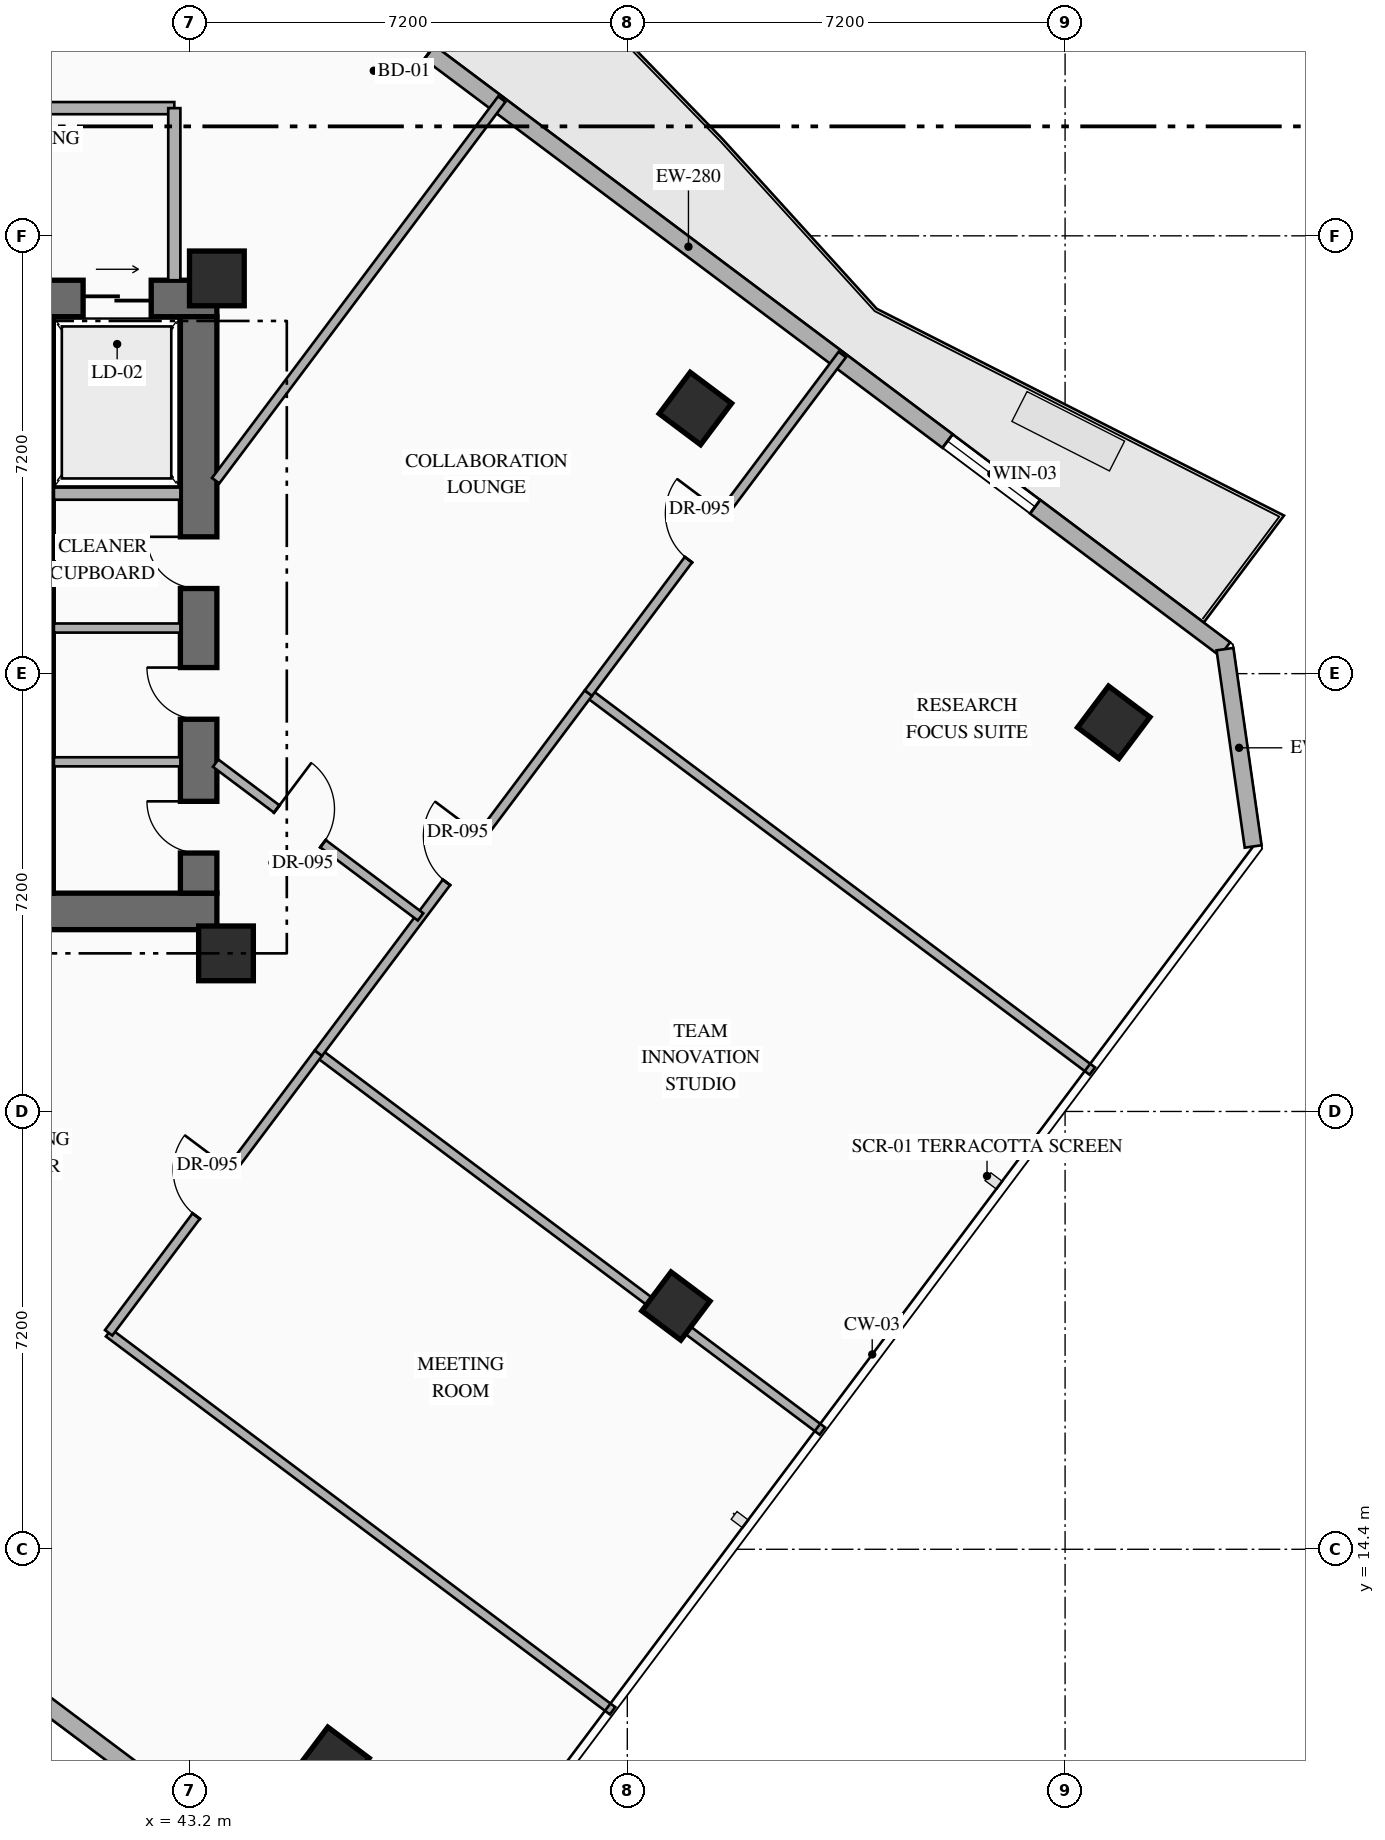
"""IFC4 building model, lengths in metres.
Left out: names, types, materials, properties, quantities, classifications, styles, units other than length and angle.
Written with IfcOpenShell. Run it as: python <this file> out.ifc"""

import sys

from ifc_helpers import new_model, si_unit, direction, frame, frame_2d, origin, origin_2d, place, context, subcontext, project, spatial, rectangle, hollow_rectangle, extrude, element, fill, save


model = new_model("IFC4")
c1 = context("Model", 3, precision=1e-05, world=origin(), true_north=direction((0.0, 1.0)))
c2 = subcontext(c1, "Body", "Model", "MODEL_VIEW")
j1 = project(units=[si_unit("LENGTHUNIT", "METRE"), si_unit("PLANEANGLEUNIT", "RADIAN")], contexts=[c1])
p1 = place(None, origin())
s1 = spatial("IfcSite", under=j1, at=p1, CompositionType="ELEMENT")
p2 = place(p1, origin())
s2 = spatial("IfcBuilding", under=s1, at=p2, CompositionType="ELEMENT")
p3 = place(p2, frame((0.0, 0.0, 160.05)))
s3 = spatial("IfcBuildingStorey", under=s2, at=p3, CompositionType="ELEMENT", Elevation=160.05)
p4 = place(p3, frame((35.89, 24.89, 0.0), z_axis=(0.0, 0.0, 1.0), x_axis=(1.0, 0.0, 0.0)))
e1 = element("IfcWall", 1, at=p4, inside=s3, PredefinedType="SHEAR", context=c2, shape_type="SweptSolid", body=[
    extrude(rectangle(XDim=7.76, YDim=0.6, at=frame_2d((3.88, 0.0))), origin(), (0.0, 0.0, 1.0), 3.6),
])
p5 = place(p3, frame((35.89, 34.97, 0.0), z_axis=(0.0, 0.0, 1.0), x_axis=(1.0, 0.0, 0.0)))
e2 = element("IfcWall", 2, at=p5, inside=s3, PredefinedType="SHEAR", context=c2, shape_type="SweptSolid", body=[
    extrude(rectangle(XDim=7.76, YDim=0.6, at=frame_2d((3.88, 0.0))), origin(), (0.0, 0.0, 1.0), 3.6),
])
p6 = place(p5, frame((2.66, 0.0, 0.0)))
e3 = element("IfcOpeningElement", 3, at=p6, cuts=e2, PredefinedType="OPENING", context=c2, shape_type="SweptSolid", body=[
    extrude(rectangle(XDim=1.1, YDim=2.2, at=frame_2d((0.55, 1.1))), frame((0.0, 0.31, 0.0), z_axis=(0.0, -1.0, 0.0), x_axis=(1.0, 0.0, 0.0)), (0.0, 0.0, 1.0), 0.62),
])
p7 = place(p5, frame((5.56, 0.0, 0.0)))
e4 = element("IfcOpeningElement", 4, at=p7, cuts=e2, PredefinedType="OPENING", context=c2, shape_type="SweptSolid", body=[
    extrude(rectangle(XDim=1.12, YDim=2.15, at=frame_2d((0.56, 1.075))), frame((0.0, 0.31, 0.0), z_axis=(0.0, -1.0, 0.0), x_axis=(1.0, 0.0, 0.0)), (0.0, 0.0, 1.0), 0.62),
])
p8 = place(p3, frame((43.35, 25.19, 0.0), z_axis=(0.0, 0.0, 1.0), x_axis=(0.0, 1.0, 0.0)))
e5 = element("IfcWall", 5, at=p8, inside=s3, PredefinedType="SHEAR", context=c2, shape_type="SweptSolid", body=[
    extrude(rectangle(XDim=9.48, YDim=0.6, at=frame_2d((4.74, 0.0))), origin(), (0.0, 0.0, 1.0), 3.6),
])
p9 = place(p8, frame((0.66, 0.0, 0.0)))
e6 = element("IfcOpeningElement", 6, at=p9, cuts=e5, PredefinedType="OPENING", context=c2, shape_type="SweptSolid", body=[
    extrude(rectangle(XDim=0.85, YDim=2.08, at=frame_2d((0.425, 1.04))), frame((0.0, 0.31, 0.0), z_axis=(0.0, -1.0, 0.0), x_axis=(1.0, 0.0, 0.0)), (0.0, 0.0, 1.0), 0.62),
])
p10 = place(p8, frame((2.86, 0.0, 0.0)))
e7 = element("IfcOpeningElement", 7, at=p10, cuts=e5, PredefinedType="OPENING", context=c2, shape_type="SweptSolid", body=[
    extrude(rectangle(XDim=0.85, YDim=2.08, at=frame_2d((0.425, 1.04))), frame((0.0, 0.31, 0.0), z_axis=(0.0, -1.0, 0.0), x_axis=(1.0, 0.0, 0.0)), (0.0, 0.0, 1.0), 0.62),
])
p11 = place(p8, frame((5.01, 0.0, 0.0)))
e8 = element("IfcOpeningElement", 8, at=p11, cuts=e5, PredefinedType="OPENING", context=c2, shape_type="SweptSolid", body=[
    extrude(rectangle(XDim=0.85, YDim=2.08, at=frame_2d((0.425, 1.04))), frame((0.0, 0.31, 0.0), z_axis=(0.0, -1.0, 0.0), x_axis=(1.0, 0.0, 0.0)), (0.0, 0.0, 1.0), 0.62),
])
p12 = place(p3, frame((40.81, 25.19, 0.0), z_axis=(0.0, 0.0, 1.0), x_axis=(0.0, 1.0, 0.0)))
e9 = element("IfcWall", 9, at=p12, inside=s3, PredefinedType="SHEAR", context=c2, shape_type="SweptSolid", body=[
    extrude(rectangle(XDim=9.48, YDim=0.3, at=frame_2d((4.74, 0.0))), origin(), (0.0, 0.0, 1.0), 3.6),
])
for number, where, z_axis, x_axis in (
    (10, (43.8, 24.2, 0.0), (0.0, 0.0, 1.0), (1.0, 0.0, 0.0)),
    (11, (43.65, 35.3, 0.0), (0.0, 0.0, 1.0), (1.0, 0.0, 0.0)),
):
    element("IfcColumn", number, at=place(p3, frame(where, z_axis=z_axis, x_axis=x_axis)), inside=s3, PredefinedType="COLUMN", context=c2, shape_type="SweptSolid", body=[
        extrude(rectangle(XDim=0.9, YDim=0.9, at=origin_2d()), origin(), (0.0, 0.0, 1.0), 3.6),
    ])
for number, where, z_axis, x_axis in (
    (12, (51.52, 33.16, 0.0), (0.0, 0.0, 1.0), (0.8, -0.6, 0.0)),
    (13, (45.56, 10.88, 0.0), (0.0, 0.0, 1.0), (0.8, -0.6, 0.0)),
    (14, (58.4, 28.0, 0.0), (0.0, 0.0, 1.0), (0.8, -0.6, 0.0)),
):
    element("IfcColumn", number, at=place(p3, frame(where, z_axis=z_axis, x_axis=x_axis)), inside=s3, PredefinedType="COLUMN", context=c2, shape_type="SweptSolid", body=[
        extrude(hollow_rectangle(XDim=0.85, YDim=0.85, WallThickness=0.032, at=origin_2d()), origin(), (0.0, 0.0, 1.0), 3.6),
    ])
p13 = place(p3, frame((51.2, 18.4, 0.0), z_axis=(0.0, 0.0, 1.0), x_axis=(0.799999996291, -0.600000004945, 0.0)))
e15 = element("IfcColumn", 15, at=p13, inside=s3, PredefinedType="COLUMN", context=c2, shape_type="SweptSolid", body=[
    extrude(hollow_rectangle(XDim=0.8, YDim=0.8, WallThickness=0.032, at=origin_2d()), origin(), (0.0, 0.0, 1.0), 3.6),
])
p14 = place(p3, frame((44.86, 40.73, 0.0), z_axis=(0.0, 0.0, 1.0), x_axis=(0.800007624502, -0.599989833863, 0.0)))
e16 = element("IfcWall", 16, at=p14, inside=s3, PredefinedType="STANDARD", context=c2, shape_type="SweptSolid", body=[
    extrude(rectangle(XDim=19.212, YDim=0.28, at=frame_2d((9.606, 0.0))), origin(), (0.0, 0.0, 1.0), 3.35),
])
p15 = place(p14, frame((1.755, 0.0, 0.0)))
e17 = element("IfcOpeningElement", 17, at=p15, cuts=e16, PredefinedType="OPENING", context=c2, shape_type="SweptSolid", body=[
    extrude(rectangle(XDim=1.1, YDim=2.2, at=frame_2d((0.55, 1.1))), frame((0.0, 0.15, 0.0), z_axis=(0.0, -1.0, 0.0), x_axis=(1.0, 0.0, 0.0)), (0.0, 0.0, 1.0), 0.3),
])
p16 = place(p14, frame((13.509, 0.0, 0.85)))
e18 = element("IfcOpeningElement", 18, at=p16, cuts=e16, PredefinedType="OPENING", context=c2, shape_type="SweptSolid", body=[
    extrude(rectangle(XDim=1.8, YDim=2.1, at=frame_2d((0.9, 1.05))), frame((0.0, 0.15, 0.0), z_axis=(0.0, -1.0, 0.0), x_axis=(1.0, 0.0, 0.0)), (0.0, 0.0, 1.0), 0.3),
])
p17 = place(p3, frame((60.23, 29.203, 0.0), z_axis=(0.0, 0.0, 1.0), x_axis=(0.141296221922, -0.989967361922, 0.0)))
e19 = element("IfcWall", 19, at=p17, inside=s3, PredefinedType="STANDARD", context=c2, shape_type="SweptSolid", body=[
    extrude(rectangle(XDim=3.278, YDim=0.28, at=frame_2d((1.639, 0.0))), origin(), (0.0, 0.0, 1.0), 3.35),
])
p18 = place(p3, frame((44.918, 8.787, 0.0), z_axis=(0.0, 0.0, 1.0), x_axis=(-0.800004765927, 0.599993645378, 0.0)))
e20 = element("IfcWall", 20, at=p18, inside=s3, PredefinedType="STANDARD", context=c2, shape_type="SweptSolid", body=[
    extrude(rectangle(XDim=24.588, YDim=0.28, at=frame_2d((12.294, 0.0))), origin(), (0.0, 0.0, 1.0), 3.35),
])
p19 = place(p3, frame((40.97, 31.76, 0.0), z_axis=(0.0, 0.0, 1.0), x_axis=(1.0, 0.0, 0.0)))
e21 = element("IfcWall", 21, at=p19, inside=s3, PredefinedType="STANDARD", context=c2, shape_type="SweptSolid", body=[
    extrude(rectangle(XDim=2.08, YDim=0.2, at=frame_2d((1.04, 0.0))), origin(), (0.0, 0.0, 1.0), 3.35),
])
for number, where, z_axis, x_axis in (
    (22, (40.97, 27.35, 0.0), (0.0, 0.0, 1.0), (1.0, 0.0, 0.0)),
    (23, (40.97, 29.55, 0.0), (0.0, 0.0, 1.0), (1.0, 0.0, 0.0)),
):
    element("IfcWall", number, at=place(p3, frame(where, z_axis=z_axis, x_axis=x_axis)), inside=s3, PredefinedType="PARTITIONING", context=c2, shape_type="SweptSolid", body=[
        extrude(rectangle(XDim=2.08, YDim=0.15, at=frame_2d((1.04, 0.0))), origin(), (0.0, 0.0, 1.0), 3.35),
    ])
p20 = place(p3, frame((37.65, 38.1, 0.0), z_axis=(0.0, 0.0, 1.0), x_axis=(1.0, 0.0, 0.0)))
e24 = element("IfcWall", 24, at=p20, inside=s3, PredefinedType="STANDARD", context=c2, shape_type="SweptSolid", body=[
    extrude(rectangle(XDim=5.3, YDim=0.2, at=frame_2d((2.65, 0.0))), origin(), (0.0, 0.0, 1.0), 3.35),
])
p21 = place(p3, frame((42.95, 35.27, 0.0), z_axis=(0.0, 0.0, 1.0), x_axis=(0.0, 1.0, 0.0)))
e25 = element("IfcWall", 25, at=p21, inside=s3, PredefinedType="STANDARD", context=c2, shape_type="SweptSolid", body=[
    extrude(rectangle(XDim=2.83, YDim=0.2, at=frame_2d((1.415, 0.0))), origin(), (0.0, 0.0, 1.0), 3.35),
])
p22 = place(p3, frame((41.87, 17.96, 0.0), z_axis=(0.0, 0.0, 1.0), x_axis=(0.799991516197, -0.600011311571, 0.0)))
e26 = element("IfcWall", 26, at=p22, inside=s3, PredefinedType="PARTITIONING", context=c2, shape_type="SweptSolid", body=[
    extrude(rectangle(XDim=10.36, YDim=0.15, at=frame_2d((5.18, 0.0))), origin(), (0.0, 0.0, 1.0), 3.35),
])
p23 = place(p3, frame((45.32, 22.56, 0.0), z_axis=(0.0, 0.0, 1.0), x_axis=(0.799991516197, -0.600011311571, 0.0)))
e27 = element("IfcWall", 27, at=p23, inside=s3, PredefinedType="PARTITIONING", context=c2, shape_type="SweptSolid", body=[
    extrude(rectangle(XDim=10.36, YDim=0.15, at=frame_2d((5.18, 0.0))), origin(), (0.0, 0.0, 1.0), 2.695),
])
p24 = place(p3, frame((41.87, 17.96, 0.0), z_axis=(0.0, 0.0, 1.0), x_axis=(0.599986413072, 0.800010190015, 0.0)))
e28 = element("IfcWall", 28, at=p24, inside=s3, PredefinedType="PARTITIONING", context=c2, shape_type="SweptSolid", body=[
    extrude(rectangle(XDim=5.75, YDim=0.15, at=frame_2d((2.875, 0.0))), origin(), (0.0, 0.0, 1.0), 3.35),
])
p25 = place(p24, frame((2.4, 0.0, 0.0)))
e29 = element("IfcOpeningElement", 29, at=p25, cuts=e28, PredefinedType="OPENING", context=c2, shape_type="SweptSolid", body=[
    extrude(rectangle(XDim=0.95, YDim=2.15, at=frame_2d((0.475, 1.075))), frame((0.0, 0.085, 0.0), z_axis=(0.0, -1.0, 0.0), x_axis=(1.0, 0.0, 0.0)), (0.0, 0.0, 1.0), 0.17),
])
p26 = place(p3, frame((49.76, 28.48, 0.0), z_axis=(0.0, 0.0, 1.0), x_axis=(0.8, -0.6, 0.0)))
e30 = element("IfcWall", 30, at=p26, inside=s3, PredefinedType="PARTITIONING", context=c2, shape_type="SweptSolid", body=[
    extrude(rectangle(XDim=10.36, YDim=0.15, at=frame_2d((5.18, 0.0))), origin(), (0.0, 0.0, 1.0), 3.35),
])
p27 = place(p3, frame((45.32, 22.56, 0.0), z_axis=(0.0, 0.0, 1.0), x_axis=(0.6, 0.8, 0.0)))
e31 = element("IfcWall", 31, at=p27, inside=s3, PredefinedType="PARTITIONING", context=c2, shape_type="SweptSolid", body=[
    extrude(rectangle(XDim=7.4, YDim=0.15, at=frame_2d((3.7, 0.0))), origin(), (0.0, 0.0, 1.0), 3.35),
])
p28 = place(p27, frame((3.51, 0.0, 0.0)))
e32 = element("IfcOpeningElement", 32, at=p28, cuts=e31, PredefinedType="OPENING", context=c2, shape_type="SweptSolid", body=[
    extrude(rectangle(XDim=0.95, YDim=2.15, at=frame_2d((0.475, 1.075))), frame((0.0, 0.085, 0.0), z_axis=(0.0, -1.0, 0.0), x_axis=(1.0, 0.0, 0.0)), (0.0, 0.0, 1.0), 0.17),
])
p29 = place(p3, frame((49.76, 28.48, 0.0), z_axis=(0.0, 0.0, 1.0), x_axis=(0.599994387644, 0.800004209236, 0.0)))
e33 = element("IfcWall", 33, at=p29, inside=s3, PredefinedType="PARTITIONING", context=c2, shape_type="SweptSolid", body=[
    extrude(rectangle(XDim=6.96, YDim=0.15, at=frame_2d((3.48, 0.0))), origin(), (0.0, 0.0, 1.0), 3.35),
])
p30 = place(p29, frame((2.743, 0.0, 0.0)))
e34 = element("IfcOpeningElement", 34, at=p30, cuts=e33, PredefinedType="OPENING", context=c2, shape_type="SweptSolid", body=[
    extrude(rectangle(XDim=0.95, YDim=2.15, at=frame_2d((0.475, 1.075))), frame((0.0, 0.085, 0.0), z_axis=(0.0, -1.0, 0.0), x_axis=(1.0, 0.0, 0.0)), (0.0, 0.0, 1.0), 0.17),
])
p31 = place(p3, frame((43.63, 27.328, 0.0), z_axis=(0.0, 0.0, 1.0), x_axis=(0.799972182084, -0.600037088764, 0.0)))
e35 = element("IfcWall", 35, at=p31, inside=s3, PredefinedType="PARTITIONING", context=c2, shape_type="SweptSolid", body=[
    extrude(rectangle(XDim=4.213, YDim=0.15, at=frame_2d((2.106, 0.0))), origin(), (0.0, 0.0, 1.0), 3.045),
])
p32 = place(p31, frame((1.256, 0.0, 0.0)))
e36 = element("IfcOpeningElement", 36, at=p32, cuts=e35, PredefinedType="OPENING", context=c2, shape_type="SweptSolid", body=[
    extrude(rectangle(XDim=0.95, YDim=2.15, at=frame_2d((0.475, 1.075))), frame((0.0, 0.085, 0.0), z_axis=(0.0, -1.0, 0.0), x_axis=(1.0, 0.0, 0.0)), (0.0, 0.0, 1.0), 0.17),
])
p33 = place(p3, frame((43.63, 31.973, 0.0), z_axis=(0.0, 0.0, 1.0), x_axis=(0.599975099311, 0.800018674911, 0.0)))
e37 = element("IfcWall", 37, at=p33, inside=s3, PredefinedType="PARTITIONING", context=c2, shape_type="SweptSolid", body=[
    extrude(rectangle(XDim=7.844, YDim=0.15, at=frame_2d((3.922, 0.0))), origin(), (0.0, 0.0, 1.0), 3.35),
])
p34 = place(p15, origin())
e38 = element("IfcDoor", 38, at=p34, inside=s3, OperationType="SINGLE_SWING_LEFT", PredefinedType="DOOR", context=c2, shape_type="SweptSolid", body=[
    extrude(rectangle(XDim=1.1, YDim=2.2, at=frame_2d((0.55, 1.1))), frame((0.0, 0.025, 0.0), z_axis=(0.0, -1.0, 0.0), x_axis=(1.0, 0.0, 0.0)), (0.0, 0.0, 1.0), 0.05),
])
fill(e17, e38)
p35 = place(p16, origin())
e39 = element("IfcWindow", 39, at=p35, inside=s3, PartitioningType="SINGLE_PANEL", PredefinedType="WINDOW", context=c2, shape_type="SweptSolid", body=[
    extrude(rectangle(XDim=1.8, YDim=2.1, at=frame_2d((0.9, 1.05))), frame((0.0, 0.03, 0.0), z_axis=(0.0, -1.0, 0.0), x_axis=(1.0, 0.0, 0.0)), (0.0, 0.0, 1.0), 0.06),
])
fill(e18, e39)
p36 = place(p7, origin())
e40 = element("IfcDoor", 40, at=p36, inside=s3, OperationType="SLIDING_TO_RIGHT", PredefinedType="USERDEFINED", context=c2, shape_type="SweptSolid", body=[
    extrude(rectangle(XDim=1.12, YDim=2.15, at=frame_2d((0.56, 1.075))), frame((0.0, 0.025, 0.0), z_axis=(0.0, -1.0, 0.0), x_axis=(1.0, 0.0, 0.0)), (0.0, 0.0, 1.0), 0.05),
])
fill(e4, e40)
p37 = place(p9, origin())
e41 = element("IfcDoor", 41, at=p37, inside=s3, OperationType="SINGLE_SWING_RIGHT", PredefinedType="DOOR", context=c2, shape_type="SweptSolid", body=[
    extrude(rectangle(XDim=0.85, YDim=2.08, at=frame_2d((0.425, 1.04))), frame((0.0, 0.025, 0.0), z_axis=(0.0, -1.0, 0.0), x_axis=(1.0, 0.0, 0.0)), (0.0, 0.0, 1.0), 0.05),
])
fill(e6, e41)
p38 = place(p10, origin())
e42 = element("IfcDoor", 42, at=p38, inside=s3, OperationType="SINGLE_SWING_RIGHT", PredefinedType="DOOR", context=c2, shape_type="SweptSolid", body=[
    extrude(rectangle(XDim=0.85, YDim=2.08, at=frame_2d((0.425, 1.04))), frame((0.0, 0.025, 0.0), z_axis=(0.0, -1.0, 0.0), x_axis=(1.0, 0.0, 0.0)), (0.0, 0.0, 1.0), 0.05),
])
fill(e7, e42)
p39 = place(p11, origin())
e43 = element("IfcDoor", 43, at=p39, inside=s3, OperationType="SINGLE_SWING_RIGHT", PredefinedType="DOOR", context=c2, shape_type="SweptSolid", body=[
    extrude(rectangle(XDim=0.85, YDim=2.08, at=frame_2d((0.425, 1.04))), frame((0.0, 0.025, 0.0), z_axis=(0.0, -1.0, 0.0), x_axis=(1.0, 0.0, 0.0)), (0.0, 0.0, 1.0), 0.05),
])
fill(e8, e43)
p40 = place(p25, origin())
e44 = element("IfcDoor", 44, at=p40, inside=s3, OperationType="SINGLE_SWING_RIGHT", PredefinedType="DOOR", context=c2, shape_type="SweptSolid", body=[
    extrude(rectangle(XDim=0.95, YDim=2.15, at=frame_2d((0.475, 1.075))), frame((0.0, 0.025, 0.0), z_axis=(0.0, -1.0, 0.0), x_axis=(1.0, 0.0, 0.0)), (0.0, 0.0, 1.0), 0.05),
])
fill(e29, e44)
p41 = place(p28, origin())
e45 = element("IfcDoor", 45, at=p41, inside=s3, OperationType="SINGLE_SWING_RIGHT", PredefinedType="DOOR", context=c2, shape_type="SweptSolid", body=[
    extrude(rectangle(XDim=0.95, YDim=2.15, at=frame_2d((0.475, 1.075))), frame((0.0, 0.025, 0.0), z_axis=(0.0, -1.0, 0.0), x_axis=(1.0, 0.0, 0.0)), (0.0, 0.0, 1.0), 0.05),
])
fill(e32, e45)
p42 = place(p30, origin())
e46 = element("IfcDoor", 46, at=p42, inside=s3, OperationType="SINGLE_SWING_RIGHT", PredefinedType="DOOR", context=c2, shape_type="SweptSolid", body=[
    extrude(rectangle(XDim=0.95, YDim=2.15, at=frame_2d((0.475, 1.075))), frame((0.0, 0.025, 0.0), z_axis=(0.0, -1.0, 0.0), x_axis=(1.0, 0.0, 0.0)), (0.0, 0.0, 1.0), 0.05),
])
fill(e34, e46)
p43 = place(p32, origin())
e47 = element("IfcDoor", 47, at=p43, inside=s3, OperationType="SINGLE_SWING_LEFT", PredefinedType="DOOR", context=c2, shape_type="SweptSolid", body=[
    extrude(rectangle(XDim=0.95, YDim=2.15, at=frame_2d((0.475, 1.075))), frame((0.0, 0.025, 0.0), z_axis=(0.0, -1.0, 0.0), x_axis=(1.0, 0.0, 0.0)), (0.0, 0.0, 1.0), 0.05),
])
fill(e36, e47)
save(model, sys.argv[1])
